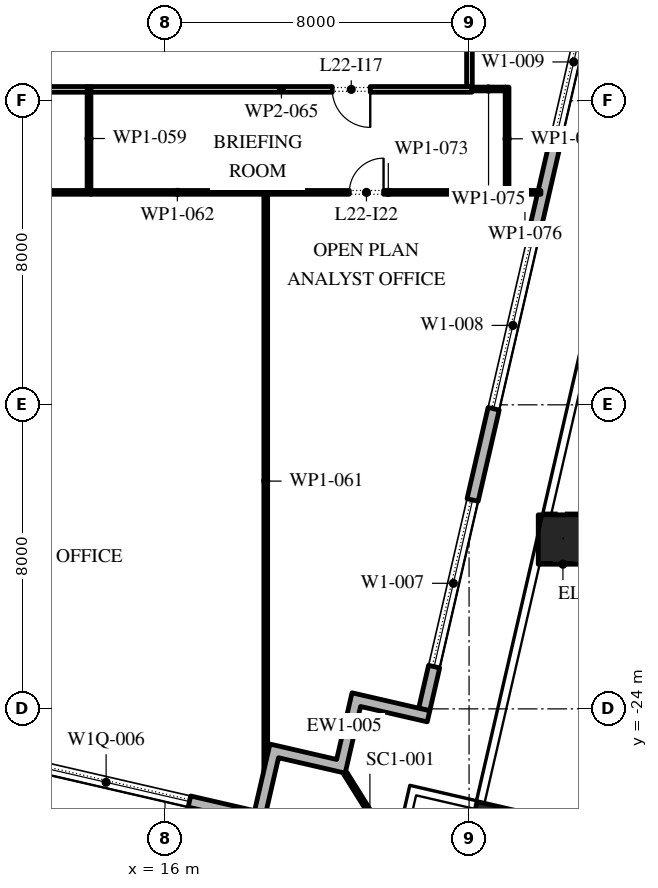
"""IFC4 building model, lengths in metres.
Left out: names, types, materials, properties, quantities, classifications, styles, units other than length and angle.
Written with IfcOpenShell. Run it as: python <this file> out.ifc"""

import sys

from ifc_helpers import new_model, si_unit, direction, frame, frame_2d, origin, origin_2d, place, context, subcontext, project, spatial, polyline, rectangle, outline, extrude, element, fill, save


model = new_model("IFC4")
c1 = context("Model", 3, precision=1e-05, world=origin(), true_north=direction((0.0, 1.0)))
c2 = subcontext(c1, "Body", "Model", "MODEL_VIEW")
j1 = project(units=[si_unit("LENGTHUNIT", "METRE"), si_unit("PLANEANGLEUNIT", "RADIAN")], contexts=[c1])
p1 = place(None, origin())
s1 = spatial("IfcSite", under=j1, at=p1, CompositionType="ELEMENT")
p2 = place(p1, origin())
s2 = spatial("IfcBuilding", under=s1, at=p2, CompositionType="ELEMENT")
p3 = place(p2, frame((0.0, 0.0, 105.6)))
s3 = spatial("IfcBuildingStorey", under=s2, at=p3, CompositionType="ELEMENT", Elevation=105.6)
p4 = place(p3, frame((24.698, -27.22, 0.0), z_axis=(0.0, 0.0, 1.0), x_axis=(0.974370064785, -0.224951054344, 0.0)))
e1 = element("IfcColumn", 1, at=p4, inside=s3, PredefinedType="COLUMN", context=c2, shape_type="SweptSolid", body=[
    extrude(rectangle(XDim=1.3, YDim=1.3, at=origin_2d()), origin(), (0.0, 0.0, 1.0), 4.2),
])
p5 = place(p3, frame((26.47, -19.544, 0.0), z_axis=(0.002964348167, 0.012671135303, 0.9999153239), x_axis=(-0.973709261374, 0.227794368487, 0.0)))
e2 = element("IfcColumn", 2, at=p5, inside=s3, PredefinedType="COLUMN", context=c2, shape_type="SweptSolid", body=[
    extrude(rectangle(XDim=1.3, YDim=1.3, at=origin_2d()), origin(), (0.0, 0.0, 1.0), 4.2),
])
p6 = place(p3, frame((-31.078, -15.421, 0.0), z_axis=(0.0, 0.0, 1.0), x_axis=(0.974370456532, -0.224949357493, 0.0)))
e3 = element("IfcWall", 3, at=p6, inside=s3, PredefinedType="STANDARD", context=c2, shape_type="SweptSolid", body=[
    extrude(rectangle(XDim=51.0, YDim=0.3, at=frame_2d((25.5, 0.0))), origin(), (0.0, 0.0, 1.0), 4.0),
])
p7 = place(p6, frame((1.875, 0.0, 0.45)))
e4 = element("IfcOpeningElement", 4, at=p7, cuts=e3, PredefinedType="OPENING", context=c2, shape_type="SweptSolid", body=[
    extrude(rectangle(XDim=4.5, YDim=2.65, at=frame_2d((2.25, 1.325))), frame((0.0, 0.16, 0.0), z_axis=(0.0, -1.0, 0.0), x_axis=(1.0, 0.0, 0.0)), (0.0, 0.0, 1.0), 0.32),
])
p8 = place(p6, frame((10.275, 0.0, 0.45)))
e5 = element("IfcOpeningElement", 5, at=p8, cuts=e3, PredefinedType="OPENING", context=c2, shape_type="SweptSolid", body=[
    extrude(rectangle(XDim=4.5, YDim=2.525, at=frame_2d((2.25, 1.262))), frame((0.0, 0.16, 0.0), z_axis=(0.0, -1.0, 0.0), x_axis=(1.0, 0.0, 0.0)), (0.0, 0.0, 1.0), 0.32),
])
p9 = place(p6, frame((18.825, 0.0, 0.45)))
e6 = element("IfcOpeningElement", 6, at=p9, cuts=e3, PredefinedType="OPENING", context=c2, shape_type="SweptSolid", body=[
    extrude(rectangle(XDim=4.5, YDim=2.5, at=frame_2d((2.25, 1.25))), frame((0.0, 0.16, 0.0), z_axis=(0.0, -1.0, 0.0), x_axis=(1.0, 0.0, 0.0)), (0.0, 0.0, 1.0), 0.32),
])
p10 = place(p6, frame((27.075, 0.0, 0.0)))
e7 = element("IfcOpeningElement", 7, at=p10, cuts=e3, PredefinedType="OPENING", context=c2, shape_type="SweptSolid", body=[
    extrude(rectangle(XDim=2.4, YDim=2.9, at=frame_2d((1.2, 1.45))), frame((0.0, 0.16, 0.0), z_axis=(0.0, -1.0, 0.0), x_axis=(1.0, 0.0, 0.0)), (0.0, 0.0, 1.0), 0.32),
])
p11 = place(p6, frame((35.925, 0.0, 0.45)))
e8 = element("IfcOpeningElement", 8, at=p11, cuts=e3, PredefinedType="OPENING", context=c2, shape_type="SweptSolid", body=[
    extrude(rectangle(XDim=4.5, YDim=2.45, at=frame_2d((2.25, 1.225))), frame((0.0, 0.16, 0.0), z_axis=(0.0, -1.0, 0.0), x_axis=(1.0, 0.0, 0.0)), (0.0, 0.0, 1.0), 0.32),
])
p12 = place(p6, frame((44.475, 0.0, 0.45)))
e9 = element("IfcOpeningElement", 9, at=p12, cuts=e3, PredefinedType="OPENING", context=c2, shape_type="SweptSolid", body=[
    extrude(rectangle(XDim=4.5, YDim=2.45, at=frame_2d((2.25, 1.225))), frame((0.0, 0.16, 0.0), z_axis=(0.0, -1.0, 0.0), x_axis=(1.0, 0.0, 0.0)), (0.0, 0.0, 1.0), 0.32),
])
p13 = place(p3, frame((22.82, -24.016, 0.0), z_axis=(0.0, 0.0, 1.0), x_axis=(0.224953880882, 0.974369412223, 0.0)))
e10 = element("IfcWall", 10, at=p13, inside=s3, PredefinedType="STANDARD", context=c2, shape_type="SweptSolid", body=[
    extrude(rectangle(XDim=49.5, YDim=0.3, at=frame_2d((24.75, 0.0))), origin(), (0.0, 0.0, 1.0), 4.0),
])
p14 = place(p13, frame((1.157, 0.0, 0.45)))
e11 = element("IfcOpeningElement", 11, at=p14, cuts=e10, PredefinedType="OPENING", context=c2, shape_type="SweptSolid", body=[
    extrude(rectangle(XDim=4.5, YDim=3.05, at=frame_2d((2.25, 1.525))), frame((0.0, 0.16, 0.0), z_axis=(0.0, -1.0, 0.0), x_axis=(1.0, 0.0, 0.0)), (0.0, 0.0, 1.0), 0.32),
])
p15 = place(p13, frame((8.121, 0.0, 0.45)))
e12 = element("IfcOpeningElement", 12, at=p15, cuts=e10, PredefinedType="OPENING", context=c2, shape_type="SweptSolid", body=[
    extrude(rectangle(XDim=4.5, YDim=3.05, at=frame_2d((2.25, 1.525))), frame((0.0, 0.16, 0.0), z_axis=(0.0, -1.0, 0.0), x_axis=(1.0, 0.0, 0.0)), (0.0, 0.0, 1.0), 0.32),
])
p16 = place(p13, frame((15.236, 0.0, 0.45)))
e13 = element("IfcOpeningElement", 13, at=p16, cuts=e10, PredefinedType="OPENING", context=c2, shape_type="SweptSolid", body=[
    extrude(rectangle(XDim=4.5, YDim=3.05, at=frame_2d((2.25, 1.525))), frame((0.0, 0.16, 0.0), z_axis=(0.0, -1.0, 0.0), x_axis=(1.0, 0.0, 0.0)), (0.0, 0.0, 1.0), 0.32),
])
p17 = place(p13, frame((23.4, 0.0, 0.0)))
e14 = element("IfcOpeningElement", 14, at=p17, cuts=e10, PredefinedType="OPENING", context=c2, shape_type="SweptSolid", body=[
    extrude(rectangle(XDim=2.4, YDim=3.5, at=frame_2d((1.2, 1.75))), frame((0.0, 0.16, 0.0), z_axis=(0.0, -1.0, 0.0), x_axis=(1.0, 0.0, 0.0)), (0.0, 0.0, 1.0), 0.32),
])
p18 = place(p13, frame((29.464, 0.0, 0.45)))
e15 = element("IfcOpeningElement", 15, at=p18, cuts=e10, PredefinedType="OPENING", context=c2, shape_type="SweptSolid", body=[
    extrude(rectangle(XDim=4.5, YDim=2.875, at=frame_2d((2.25, 1.438))), frame((0.0, 0.16, 0.0), z_axis=(0.0, -1.0, 0.0), x_axis=(1.0, 0.0, 0.0)), (0.0, 0.0, 1.0), 0.32),
])
p19 = place(p13, frame((36.579, 0.0, 0.45)))
e16 = element("IfcOpeningElement", 16, at=p19, cuts=e10, PredefinedType="OPENING", context=c2, shape_type="SweptSolid", body=[
    extrude(rectangle(XDim=4.5, YDim=2.825, at=frame_2d((2.25, 1.413))), frame((0.0, 0.16, 0.0), z_axis=(0.0, -1.0, 0.0), x_axis=(1.0, 0.0, 0.0)), (0.0, 0.0, 1.0), 0.32),
])
p20 = place(p13, frame((43.693, 0.0, 0.45)))
e17 = element("IfcOpeningElement", 17, at=p20, cuts=e10, PredefinedType="OPENING", context=c2, shape_type="SweptSolid", body=[
    extrude(rectangle(XDim=4.5, YDim=2.75, at=frame_2d((2.25, 1.375))), frame((0.0, 0.16, 0.0), z_axis=(0.0, -1.0, 0.0), x_axis=(1.0, 0.0, 0.0)), (0.0, 0.0, 1.0), 0.32),
])
p21 = place(p3, origin())
e18 = element("IfcWall", 18, at=p21, inside=s3, PredefinedType="STANDARD", context=c2, shape_type="SweptSolid", body=[
    extrude(outline(polyline([(20.515, -25.331), (20.92, -23.577), (22.967, -24.049), (22.899, -24.342), (21.145, -23.937), (20.74, -25.691), (18.986, -25.286), (18.649, -26.747), (18.357, -26.68), (18.762, -24.926), (20.515, -25.331)])), origin(), (0.0, 0.0, 1.0), 4.0),
])
p22 = place(p3, frame((20.74, -25.691, -0.05), z_axis=(0.0, 0.0, 1.0), x_axis=(0.529972121605, -0.848015064914, 0.0)))
e19 = element("IfcWall", 19, at=p22, inside=s3, PredefinedType="STANDARD", context=c2, shape_type="SweptSolid", body=[
    extrude(rectangle(XDim=2.455, YDim=0.1, at=frame_2d((1.228, 0.0))), origin(), (0.0, 0.0, 1.0), 4.05),
])
p23 = place(p3, frame((14.05, -10.41, 0.0), z_axis=(0.0, 0.0, 1.0), x_axis=(-1.0, 0.0, 0.0)))
e20 = element("IfcWall", 20, at=p23, inside=s3, PredefinedType="PARTITIONING", context=c2, shape_type="SweptSolid", body=[
    extrude(rectangle(XDim=7.66, YDim=0.1, at=frame_2d((3.83, 0.0))), origin(), (0.0, 0.0, 1.0), 4.0),
])
p24 = place(p23, frame((3.86, 0.0, 0.0)))
e21 = element("IfcOpeningElement", 21, at=p24, cuts=e20, PredefinedType="OPENING", context=c2, shape_type="SweptSolid", body=[
    extrude(rectangle(XDim=1.6, YDim=2.1, at=frame_2d((0.8, 1.05))), frame((0.0, 0.06, 0.0), z_axis=(0.0, -1.0, 0.0), x_axis=(1.0, 0.0, 0.0)), (0.0, 0.0, 1.0), 0.12),
])
p25 = place(p3, frame((14.0, -10.36, 0.0), z_axis=(0.0, 0.0, 1.0), x_axis=(0.0, 1.0, 0.0)))
e22 = element("IfcWall", 22, at=p25, inside=s3, PredefinedType="PARTITIONING", context=c2, shape_type="SweptSolid", body=[
    extrude(rectangle(XDim=2.735, YDim=0.1, at=frame_2d((1.368, 0.0))), origin(), (0.0, 0.0, 1.0), 4.0),
])
p26 = place(p3, frame((13.95, -7.7, 0.0), z_axis=(0.0, 0.0, 1.0), x_axis=(-1.0, 0.0, 0.0)))
e23 = element("IfcWall", 23, at=p26, inside=s3, PredefinedType="PARTITIONING", context=c2, shape_type="SweptSolid", body=[
    extrude(rectangle(XDim=5.875, YDim=0.15, at=frame_2d((2.938, 0.0))), origin(), (0.0, 0.0, 1.0), 4.0),
])
p27 = place(p3, frame((18.65, -25.654, 0.0), z_axis=(0.0, 0.0, 1.0), x_axis=(0.0, 1.0, 0.0)))
e24 = element("IfcWall", 24, at=p27, inside=s3, PredefinedType="PARTITIONING", context=c2, shape_type="SweptSolid", body=[
    extrude(rectangle(XDim=15.294, YDim=0.1, at=frame_2d((7.647, 0.0))), origin(), (0.0, 0.0, 1.0), 4.0),
])
p28 = place(p3, frame((18.6, -10.41, 0.0), z_axis=(0.0, 0.0, 1.0), x_axis=(-1.0, 0.0, 0.0)))
e25 = element("IfcWall", 25, at=p28, inside=s3, PredefinedType="PARTITIONING", context=c2, shape_type="SweptSolid", body=[
    extrude(rectangle(XDim=4.55, YDim=0.1, at=frame_2d((2.275, 0.0))), origin(), (0.0, 0.0, 1.0), 4.0),
])
p29 = place(p3, frame((24.075, -7.7, 0.0), z_axis=(0.0, 0.0, 1.0), x_axis=(-1.0, 0.0, 0.0)))
e26 = element("IfcWall", 26, at=p29, inside=s3, PredefinedType="PARTITIONING", context=c2, shape_type="SweptSolid", body=[
    extrude(rectangle(XDim=10.025, YDim=0.15, at=frame_2d((5.012, 0.0))), origin(), (0.0, 0.0, 1.0), 4.0),
])
p30 = place(p29, frame((2.675, 0.0, 0.0)))
e27 = element("IfcOpeningElement", 27, at=p30, cuts=e26, PredefinedType="OPENING", context=c2, shape_type="SweptSolid", body=[
    extrude(rectangle(XDim=1.0, YDim=2.1, at=frame_2d((0.5, 1.05))), frame((0.0, 0.085, 0.0), z_axis=(0.0, -1.0, 0.0), x_axis=(1.0, 0.0, 0.0)), (0.0, 0.0, 1.0), 0.17),
])
p31 = place(p3, frame((24.01, 2.66, 0.0), z_axis=(0.0, 0.0, 1.0), x_axis=(0.0, -1.0, 0.0)))
e28 = element("IfcWall", 28, at=p31, inside=s3, PredefinedType="PARTITIONING", context=c2, shape_type="SweptSolid", body=[
    extrude(rectangle(XDim=10.275, YDim=0.15, at=frame_2d((5.137, 0.0))), origin(), (0.0, 0.0, 1.0), 4.0),
])
p32 = place(p31, frame((2.7, 0.0, 0.0)))
e29 = element("IfcOpeningElement", 29, at=p32, cuts=e28, PredefinedType="OPENING", context=c2, shape_type="SweptSolid", body=[
    extrude(rectangle(XDim=1.0, YDim=2.1, at=frame_2d((0.5, 1.05))), frame((0.0, 0.085, 0.0), z_axis=(0.0, -1.0, 0.0), x_axis=(1.0, 0.0, 0.0)), (0.0, 0.0, 1.0), 0.17),
])
p33 = place(p3, frame((25.05, -10.41, 0.0), z_axis=(0.0, 0.0, 1.0), x_axis=(-1.0, 0.0, 0.0)))
e30 = element("IfcWall", 30, at=p33, inside=s3, PredefinedType="PARTITIONING", context=c2, shape_type="SweptSolid", body=[
    extrude(rectangle(XDim=6.35, YDim=0.1, at=frame_2d((3.175, 0.0))), origin(), (0.0, 0.0, 1.0), 4.0),
])
p34 = place(p33, frame((3.3, 0.0, 0.0)))
e31 = element("IfcOpeningElement", 31, at=p34, cuts=e30, PredefinedType="OPENING", context=c2, shape_type="SweptSolid", body=[
    extrude(rectangle(XDim=0.9, YDim=2.1, at=frame_2d((0.45, 1.05))), frame((0.0, 0.06, 0.0), z_axis=(0.0, -1.0, 0.0), x_axis=(1.0, 0.0, 0.0)), (0.0, 0.0, 1.0), 0.12),
])
p35 = place(p3, frame((25.0, -10.36, 0.0), z_axis=(0.0, 0.0, 1.0), x_axis=(0.0, 1.0, 0.0)))
e32 = element("IfcWall", 32, at=p35, inside=s3, PredefinedType="PARTITIONING", context=c2, shape_type="SweptSolid", body=[
    extrude(rectangle(XDim=2.72, YDim=0.1, at=frame_2d((1.36, 0.0))), origin(), (0.0, 0.0, 1.0), 4.0),
])
p36 = place(p3, frame((24.95, -7.69, 0.0), z_axis=(0.0, 0.0, 1.0), x_axis=(-1.0, 0.0, 0.0)))
e33 = element("IfcWall", 33, at=p36, inside=s3, PredefinedType="PARTITIONING", context=c2, shape_type="SweptSolid", body=[
    extrude(rectangle(XDim=0.875, YDim=0.1, at=frame_2d((0.438, 0.0))), origin(), (0.0, 0.0, 1.0), 4.0),
])
p37 = place(p3, frame((25.89, -10.41, 0.0), z_axis=(0.0, 0.0, 1.0), x_axis=(-1.0, 0.0, 0.0)))
e34 = element("IfcWall", 34, at=p37, inside=s3, PredefinedType="PARTITIONING", context=c2, shape_type="SweptSolid", body=[
    extrude(rectangle(XDim=0.84, YDim=0.1, at=frame_2d((0.42, 0.0))), origin(), (0.0, 0.0, 1.0), 4.0),
])
p38 = place(p12, origin())
e35 = element("IfcWindow", 35, at=p38, inside=s3, PartitioningType="DOUBLE_PANEL_VERTICAL", PredefinedType="WINDOW", context=c2, shape_type="SweptSolid", body=[
    extrude(rectangle(XDim=4.5, YDim=2.45, at=frame_2d((2.25, 1.225))), frame((0.0, 0.03, 0.0), z_axis=(0.0, -1.0, 0.0), x_axis=(1.0, 0.0, 0.0)), (0.0, 0.0, 1.0), 0.06),
])
fill(e9, e35)
p39 = place(p14, origin())
e36 = element("IfcWindow", 36, at=p39, inside=s3, PartitioningType="DOUBLE_PANEL_VERTICAL", PredefinedType="WINDOW", context=c2, shape_type="SweptSolid", body=[
    extrude(rectangle(XDim=4.5, YDim=3.05, at=frame_2d((2.25, 1.525))), frame((0.0, 0.03, 0.0), z_axis=(0.0, -1.0, 0.0), x_axis=(1.0, 0.0, 0.0)), (0.0, 0.0, 1.0), 0.06),
])
fill(e11, e36)
p40 = place(p15, origin())
e37 = element("IfcWindow", 37, at=p40, inside=s3, PartitioningType="DOUBLE_PANEL_VERTICAL", PredefinedType="WINDOW", context=c2, shape_type="SweptSolid", body=[
    extrude(rectangle(XDim=4.5, YDim=3.05, at=frame_2d((2.25, 1.525))), frame((0.0, 0.03, 0.0), z_axis=(0.0, -1.0, 0.0), x_axis=(1.0, 0.0, 0.0)), (0.0, 0.0, 1.0), 0.06),
])
fill(e12, e37)
p41 = place(p16, origin())
e38 = element("IfcWindow", 38, at=p41, inside=s3, PartitioningType="DOUBLE_PANEL_VERTICAL", PredefinedType="WINDOW", context=c2, shape_type="SweptSolid", body=[
    extrude(rectangle(XDim=4.5, YDim=3.05, at=frame_2d((2.25, 1.525))), frame((0.0, 0.03, 0.0), z_axis=(0.0, -1.0, 0.0), x_axis=(1.0, 0.0, 0.0)), (0.0, 0.0, 1.0), 0.06),
])
fill(e13, e38)
p42 = place(p30, origin())
e39 = element("IfcDoor", 39, at=p42, inside=s3, OperationType="SINGLE_SWING_RIGHT", PredefinedType="DOOR", context=c2, shape_type="SweptSolid", body=[
    extrude(rectangle(XDim=1.0, YDim=2.1, at=frame_2d((0.5, 1.05))), frame((0.0, 0.025, 0.0), z_axis=(0.0, -1.0, 0.0), x_axis=(1.0, 0.0, 0.0)), (0.0, 0.0, 1.0), 0.05),
])
fill(e27, e39)
p43 = place(p34, frame((0.9, 0.0, 0.0), z_axis=(0.0, 0.0, 1.0), x_axis=(-1.0, 0.0, 0.0)))
e40 = element("IfcDoor", 40, at=p43, inside=s3, OperationType="SINGLE_SWING_LEFT", PredefinedType="DOOR", context=c2, shape_type="SweptSolid", body=[
    extrude(rectangle(XDim=0.9, YDim=2.1, at=frame_2d((0.45, 1.05))), frame((0.0, 0.025, 0.0), z_axis=(0.0, -1.0, 0.0), x_axis=(1.0, 0.0, 0.0)), (0.0, 0.0, 1.0), 0.05),
])
fill(e31, e40)
save(model, sys.argv[1])
